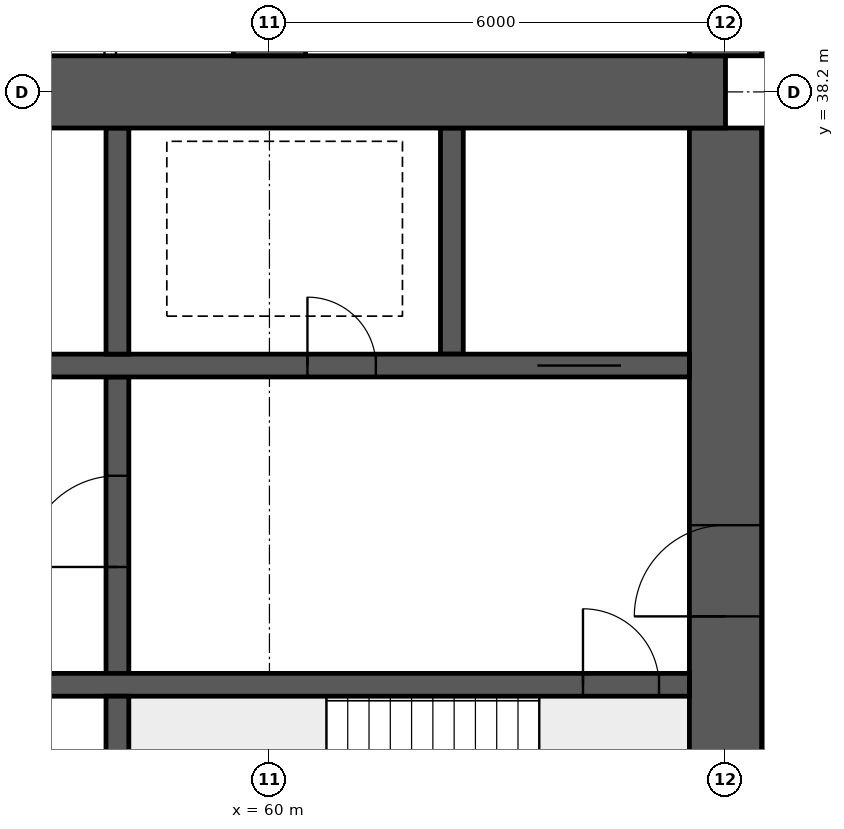
"""IFC4 building model, lengths in metres.
Left out: names, types, materials, properties, quantities, classifications, styles, units other than length and angle.
Written with IfcOpenShell. Run it as: python <this file> out.ifc"""

import sys

from ifc_helpers import new_model, si_unit, direction, frame, frame_2d, origin, place, context, subcontext, project, spatial, rectangle, extrude, element, fill, save


model = new_model("IFC4")
c1 = context("Model", 3, precision=1e-05, world=origin(), true_north=direction((0.0, 1.0)))
c2 = subcontext(c1, "Body", "Model", "MODEL_VIEW")
j1 = project(units=[si_unit("LENGTHUNIT", "METRE"), si_unit("PLANEANGLEUNIT", "RADIAN")], contexts=[c1])
p1 = place(None, origin())
s1 = spatial("IfcSite", under=j1, at=p1, CompositionType="ELEMENT")
p2 = place(p1, origin())
s2 = spatial("IfcBuilding", under=s1, at=p2, CompositionType="ELEMENT")
p3 = place(p2, frame((0.0, 0.0, 103.15)))
s3 = spatial("IfcBuildingStorey", under=s2, at=p3, CompositionType="ELEMENT", Elevation=103.15)
p4 = place(p3, frame((18.0, 38.2, 0.0), z_axis=(0.0, 0.0, 1.0), x_axis=(1.0, 0.0, 0.0)))
e1 = element("IfcWall", 1, at=p4, inside=s3, PredefinedType="SHEAR", context=c2, shape_type="SweptSolid", body=[
    extrude(rectangle(XDim=48.0, YDim=0.95, at=frame_2d((24.0, 0.0))), origin(), (0.0, 0.0, 1.0), 3.75),
])
p5 = place(p3, frame((66.0, 26.275, 0.0), z_axis=(0.0, 0.0, 1.0), x_axis=(0.0, 1.0, 0.0)))
e2 = element("IfcWall", 2, at=p5, inside=s3, PredefinedType="SHEAR", context=c2, shape_type="SweptSolid", body=[
    extrude(rectangle(XDim=11.45, YDim=0.95, at=frame_2d((5.725, 0.0))), origin(), (0.0, 0.0, 1.0), 3.75),
])
p6 = place(p5, frame((5.025, 0.0, 0.0)))
e3 = element("IfcOpeningElement", 3, at=p6, cuts=e2, PredefinedType="OPENING", context=c2, shape_type="SweptSolid", body=[
    extrude(rectangle(XDim=1.2, YDim=2.1, at=frame_2d((0.6, 1.05))), frame((0.0, 0.485, 0.0), z_axis=(0.0, -1.0, 0.0), x_axis=(1.0, 0.0, 0.0)), (0.0, 0.0, 1.0), 0.97),
])
p7 = place(p3, frame((18.475, 30.4, 0.0), z_axis=(0.0, 0.0, 1.0), x_axis=(1.0, 0.0, 0.0)))
e4 = element("IfcWall", 4, at=p7, inside=s3, PredefinedType="SHEAR", context=c2, shape_type="SweptSolid", body=[
    extrude(rectangle(XDim=47.05, YDim=0.3, at=frame_2d((23.525, 0.0))), origin(), (0.0, 0.0, 1.0), 3.75),
])
p8 = place(p7, frame((0.4, 0.0, 0.0)))
e5 = element("IfcOpeningElement", 5, at=p8, cuts=e4, PredefinedType="OPENING", context=c2, shape_type="SweptSolid", body=[
    extrude(rectangle(XDim=1.0, YDim=2.1, at=frame_2d((0.5, 1.05))), frame((0.0, 0.16, 0.0), z_axis=(0.0, -1.0, 0.0), x_axis=(1.0, 0.0, 0.0)), (0.0, 0.0, 1.0), 0.32),
])
p9 = place(p7, frame((45.65, 0.0, 0.0)))
e6 = element("IfcOpeningElement", 6, at=p9, cuts=e4, PredefinedType="OPENING", context=c2, shape_type="SweptSolid", body=[
    extrude(rectangle(XDim=1.0, YDim=2.1, at=frame_2d((0.5, 1.05))), frame((0.0, 0.16, 0.0), z_axis=(0.0, -1.0, 0.0), x_axis=(1.0, 0.0, 0.0)), (0.0, 0.0, 1.0), 0.32),
])
p10 = place(p7, frame((8.275, 0.0, 0.0)))
e7 = element("IfcOpeningElement", 7, at=p10, cuts=e4, PredefinedType="OPENING", context=c2, shape_type="SweptSolid", body=[
    extrude(rectangle(XDim=1.1, YDim=2.1, at=frame_2d((0.55, 1.05))), frame((0.0, 0.16, 0.0), z_axis=(0.0, -1.0, 0.0), x_axis=(1.0, 0.0, 0.0)), (0.0, 0.0, 1.0), 0.32),
])
p11 = place(p7, frame((10.875, 0.0, 0.0)))
e8 = element("IfcOpeningElement", 8, at=p11, cuts=e4, PredefinedType="OPENING", context=c2, shape_type="SweptSolid", body=[
    extrude(rectangle(XDim=1.1, YDim=2.1, at=frame_2d((0.55, 1.05))), frame((0.0, 0.16, 0.0), z_axis=(0.0, -1.0, 0.0), x_axis=(1.0, 0.0, 0.0)), (0.0, 0.0, 1.0), 0.32),
])
p12 = place(p7, frame((13.475, 0.0, 0.0)))
e9 = element("IfcOpeningElement", 9, at=p12, cuts=e4, PredefinedType="OPENING", context=c2, shape_type="SweptSolid", body=[
    extrude(rectangle(XDim=1.1, YDim=2.1, at=frame_2d((0.55, 1.05))), frame((0.0, 0.16, 0.0), z_axis=(0.0, -1.0, 0.0), x_axis=(1.0, 0.0, 0.0)), (0.0, 0.0, 1.0), 0.32),
])
p13 = place(p7, frame((16.075, 0.0, 0.0)))
e10 = element("IfcOpeningElement", 10, at=p13, cuts=e4, PredefinedType="OPENING", context=c2, shape_type="SweptSolid", body=[
    extrude(rectangle(XDim=1.1, YDim=2.1, at=frame_2d((0.55, 1.05))), frame((0.0, 0.16, 0.0), z_axis=(0.0, -1.0, 0.0), x_axis=(1.0, 0.0, 0.0)), (0.0, 0.0, 1.0), 0.32),
])
p14 = place(p7, frame((18.85, 0.0, 0.0)))
e11 = element("IfcOpeningElement", 11, at=p14, cuts=e4, PredefinedType="OPENING", context=c2, shape_type="SweptSolid", body=[
    extrude(rectangle(XDim=0.9, YDim=2.1, at=frame_2d((0.45, 1.05))), frame((0.0, 0.16, 0.0), z_axis=(0.0, -1.0, 0.0), x_axis=(1.0, 0.0, 0.0)), (0.0, 0.0, 1.0), 0.32),
])
p15 = place(p7, frame((30.142, 0.0, 0.0)))
e12 = element("IfcOpeningElement", 12, at=p15, cuts=e4, PredefinedType="OPENING", context=c2, shape_type="SweptSolid", body=[
    extrude(rectangle(XDim=1.1, YDim=2.1, at=frame_2d((0.55, 1.05))), frame((0.0, 0.16, 0.0), z_axis=(0.0, -1.0, 0.0), x_axis=(1.0, 0.0, 0.0)), (0.0, 0.0, 1.0), 0.32),
])
p16 = place(p7, frame((33.675, 0.0, 0.0)))
e13 = element("IfcOpeningElement", 13, at=p16, cuts=e4, PredefinedType="OPENING", context=c2, shape_type="SweptSolid", body=[
    extrude(rectangle(XDim=1.1, YDim=2.1, at=frame_2d((0.55, 1.05))), frame((0.0, 0.16, 0.0), z_axis=(0.0, -1.0, 0.0), x_axis=(1.0, 0.0, 0.0)), (0.0, 0.0, 1.0), 0.32),
])
p17 = place(p7, frame((37.208, 0.0, 0.0)))
e14 = element("IfcOpeningElement", 14, at=p17, cuts=e4, PredefinedType="OPENING", context=c2, shape_type="SweptSolid", body=[
    extrude(rectangle(XDim=1.1, YDim=2.1, at=frame_2d((0.55, 1.05))), frame((0.0, 0.16, 0.0), z_axis=(0.0, -1.0, 0.0), x_axis=(1.0, 0.0, 0.0)), (0.0, 0.0, 1.0), 0.32),
])
p18 = place(p3, frame((18.475, 34.6, 0.0), z_axis=(0.0, 0.0, 1.0), x_axis=(1.0, 0.0, 0.0)))
e15 = element("IfcWall", 15, at=p18, inside=s3, PredefinedType="SHEAR", context=c2, shape_type="SweptSolid", body=[
    extrude(rectangle(XDim=47.05, YDim=0.3, at=frame_2d((23.525, 0.0))), origin(), (0.0, 0.0, 1.0), 3.75),
])
p19 = place(p18, frame((0.9, 0.0, 0.0)))
e16 = element("IfcOpeningElement", 16, at=p19, cuts=e15, PredefinedType="OPENING", context=c2, shape_type="SweptSolid", body=[
    extrude(rectangle(XDim=1.1, YDim=2.1, at=frame_2d((0.55, 1.05))), frame((0.0, 0.16, 0.0), z_axis=(0.0, -1.0, 0.0), x_axis=(1.0, 0.0, 0.0)), (0.0, 0.0, 1.0), 0.32),
])
p20 = place(p18, frame((45.05, 0.0, 0.0)))
e17 = element("IfcOpeningElement", 17, at=p20, cuts=e15, PredefinedType="OPENING", context=c2, shape_type="SweptSolid", body=[
    extrude(rectangle(XDim=1.1, YDim=2.1, at=frame_2d((0.55, 1.05))), frame((0.0, 0.16, 0.0), z_axis=(0.0, -1.0, 0.0), x_axis=(1.0, 0.0, 0.0)), (0.0, 0.0, 1.0), 0.32),
])
p21 = place(p18, frame((4.125, 0.0, 0.0)))
e18 = element("IfcOpeningElement", 18, at=p21, cuts=e15, PredefinedType="OPENING", context=c2, shape_type="SweptSolid", body=[
    extrude(rectangle(XDim=0.9, YDim=2.1, at=frame_2d((0.45, 1.05))), frame((0.0, 0.16, 0.0), z_axis=(0.0, -1.0, 0.0), x_axis=(1.0, 0.0, 0.0)), (0.0, 0.0, 1.0), 0.32),
])
p22 = place(p18, frame((42.025, 0.0, 0.0)))
e19 = element("IfcOpeningElement", 19, at=p22, cuts=e15, PredefinedType="OPENING", context=c2, shape_type="SweptSolid", body=[
    extrude(rectangle(XDim=0.9, YDim=2.1, at=frame_2d((0.45, 1.05))), frame((0.0, 0.16, 0.0), z_axis=(0.0, -1.0, 0.0), x_axis=(1.0, 0.0, 0.0)), (0.0, 0.0, 1.0), 0.32),
])
p23 = place(p18, frame((8.9, 0.0, 0.0)))
e20 = element("IfcOpeningElement", 20, at=p23, cuts=e15, PredefinedType="OPENING", context=c2, shape_type="SweptSolid", body=[
    extrude(rectangle(XDim=0.9, YDim=2.1, at=frame_2d((0.45, 1.05))), frame((0.0, 0.16, 0.0), z_axis=(0.0, -1.0, 0.0), x_axis=(1.0, 0.0, 0.0)), (0.0, 0.0, 1.0), 0.32),
])
p24 = place(p18, frame((12.874, 0.0, 0.0)))
e21 = element("IfcOpeningElement", 21, at=p24, cuts=e15, PredefinedType="OPENING", context=c2, shape_type="SweptSolid", body=[
    extrude(rectangle(XDim=0.9, YDim=2.1, at=frame_2d((0.45, 1.05))), frame((0.0, 0.16, 0.0), z_axis=(0.0, -1.0, 0.0), x_axis=(1.0, 0.0, 0.0)), (0.0, 0.0, 1.0), 0.32),
])
p25 = place(p18, frame((16.521, 0.0, 0.0)))
e22 = element("IfcOpeningElement", 22, at=p25, cuts=e15, PredefinedType="OPENING", context=c2, shape_type="SweptSolid", body=[
    extrude(rectangle(XDim=0.9, YDim=2.1, at=frame_2d((0.45, 1.05))), frame((0.0, 0.16, 0.0), z_axis=(0.0, -1.0, 0.0), x_axis=(1.0, 0.0, 0.0)), (0.0, 0.0, 1.0), 0.32),
])
p26 = place(p18, frame((20.28, 0.0, 0.0)))
e23 = element("IfcOpeningElement", 23, at=p26, cuts=e15, PredefinedType="OPENING", context=c2, shape_type="SweptSolid", body=[
    extrude(rectangle(XDim=0.9, YDim=2.1, at=frame_2d((0.45, 1.05))), frame((0.0, 0.16, 0.0), z_axis=(0.0, -1.0, 0.0), x_axis=(1.0, 0.0, 0.0)), (0.0, 0.0, 1.0), 0.32),
])
p27 = place(p18, frame((24.686, 0.0, 0.0)))
e24 = element("IfcOpeningElement", 24, at=p27, cuts=e15, PredefinedType="OPENING", context=c2, shape_type="SweptSolid", body=[
    extrude(rectangle(XDim=0.9, YDim=2.1, at=frame_2d((0.45, 1.05))), frame((0.0, 0.16, 0.0), z_axis=(0.0, -1.0, 0.0), x_axis=(1.0, 0.0, 0.0)), (0.0, 0.0, 1.0), 0.32),
])
p28 = place(p18, frame((27.483, 0.0, 0.0)))
e25 = element("IfcOpeningElement", 25, at=p28, cuts=e15, PredefinedType="OPENING", context=c2, shape_type="SweptSolid", body=[
    extrude(rectangle(XDim=0.9, YDim=2.1, at=frame_2d((0.45, 1.05))), frame((0.0, 0.16, 0.0), z_axis=(0.0, -1.0, 0.0), x_axis=(1.0, 0.0, 0.0)), (0.0, 0.0, 1.0), 0.32),
])
p29 = place(p18, frame((29.653, 0.0, 0.0)))
e26 = element("IfcOpeningElement", 26, at=p29, cuts=e15, PredefinedType="OPENING", context=c2, shape_type="SweptSolid", body=[
    extrude(rectangle(XDim=0.9, YDim=2.1, at=frame_2d((0.45, 1.05))), frame((0.0, 0.16, 0.0), z_axis=(0.0, -1.0, 0.0), x_axis=(1.0, 0.0, 0.0)), (0.0, 0.0, 1.0), 0.32),
])
p30 = place(p18, frame((33.452, 0.0, 0.0)))
e27 = element("IfcOpeningElement", 27, at=p30, cuts=e15, PredefinedType="OPENING", context=c2, shape_type="SweptSolid", body=[
    extrude(rectangle(XDim=0.9, YDim=2.1, at=frame_2d((0.45, 1.05))), frame((0.0, 0.16, 0.0), z_axis=(0.0, -1.0, 0.0), x_axis=(1.0, 0.0, 0.0)), (0.0, 0.0, 1.0), 0.32),
])
p31 = place(p18, frame((37.403, 0.0, 0.0)))
e28 = element("IfcOpeningElement", 28, at=p31, cuts=e15, PredefinedType="OPENING", context=c2, shape_type="SweptSolid", body=[
    extrude(rectangle(XDim=0.9, YDim=2.1, at=frame_2d((0.45, 1.05))), frame((0.0, 0.16, 0.0), z_axis=(0.0, -1.0, 0.0), x_axis=(1.0, 0.0, 0.0)), (0.0, 0.0, 1.0), 0.32),
])
p32 = place(p3, frame((58.0, 26.275, 0.0), z_axis=(0.0, 0.0, 1.0), x_axis=(0.0, 1.0, 0.0)))
e29 = element("IfcWall", 29, at=p32, inside=s3, PredefinedType="SHEAR", context=c2, shape_type="SweptSolid", body=[
    extrude(rectangle(XDim=3.975, YDim=0.3, at=frame_2d((1.988, 0.0))), origin(), (0.0, 0.0, 1.0), 3.75),
])
p33 = place(p3, frame((58.0, 30.55, 0.0), z_axis=(0.0, 0.0, 1.0), x_axis=(0.0, 1.0, 0.0)))
e30 = element("IfcWall", 30, at=p33, inside=s3, PredefinedType="SHEAR", context=c2, shape_type="SweptSolid", body=[
    extrude(rectangle(XDim=3.9, YDim=0.3, at=frame_2d((1.95, 0.0))), origin(), (0.0, 0.0, 1.0), 3.75),
])
p34 = place(p33, frame((1.4, 0.0, 0.0)))
e31 = element("IfcOpeningElement", 31, at=p34, cuts=e30, PredefinedType="OPENING", context=c2, shape_type="SweptSolid", body=[
    extrude(rectangle(XDim=1.2, YDim=2.1, at=frame_2d((0.6, 1.05))), frame((0.0, 0.16, 0.0), z_axis=(0.0, -1.0, 0.0), x_axis=(1.0, 0.0, 0.0)), (0.0, 0.0, 1.0), 0.32),
])
for number, where, z_axis, x_axis in (
    (32, (62.4, 34.75, 0.0), (0.0, 0.0, 1.0), (0.0, 1.0, 0.0)),
    (33, (58.0, 34.75, 0.0), (0.0, 0.0, 1.0), (0.0, 1.0, 0.0)),
):
    element("IfcWall", number, at=place(p3, frame(where, z_axis=z_axis, x_axis=x_axis)), inside=s3, PredefinedType="SHEAR", context=c2, shape_type="SweptSolid", body=[
        extrude(rectangle(XDim=2.975, YDim=0.3, at=frame_2d((1.488, 0.0))), origin(), (0.0, 0.0, 1.0), 3.75),
    ])
for number, where, z_axis, x_axis in (
    (34, (60.0, 38.675, 0.0), (0.0, 0.0, 1.0), (0.0, 1.0, 0.0)),
    (35, (66.0, 38.675, 0.0), (0.0, 0.0, 1.0), (0.0, 1.0, 0.0)),
):
    element("IfcWall", number, at=place(p3, frame(where, z_axis=z_axis, x_axis=x_axis)), inside=s3, PredefinedType="SHEAR", context=c2, shape_type="SweptSolid", body=[
        extrude(rectangle(XDim=9.325, YDim=0.95, at=frame_2d((4.663, 0.0))), origin(), (0.0, 0.0, 1.0), 3.75),
    ])
p35 = place(p3, frame((57.905, 38.675, 0.0), z_axis=(0.0, 0.0, 1.0), x_axis=(0.0, 1.0, 0.0)))
e36 = element("IfcWall", 36, at=p35, inside=s3, PredefinedType="PARTITIONING", context=c2, shape_type="SweptSolid", body=[
    extrude(rectangle(XDim=9.225, YDim=0.15, at=frame_2d((4.612, 0.0))), origin(), (0.0, 0.0, 1.0), 3.5),
])
p36 = place(p6, origin())
e37 = element("IfcDoor", 37, at=p36, inside=s3, OperationType="SINGLE_SWING_LEFT", PredefinedType="DOOR", context=c2, shape_type="SweptSolid", body=[
    extrude(rectangle(XDim=1.2, YDim=2.1, at=frame_2d((0.6, 1.05))), frame((0.0, 0.025, 0.0), z_axis=(0.0, -1.0, 0.0), x_axis=(1.0, 0.0, 0.0)), (0.0, 0.0, 1.0), 0.05),
])
fill(e3, e37)
p37 = place(p9, origin())
e38 = element("IfcDoor", 38, at=p37, inside=s3, OperationType="SINGLE_SWING_LEFT", PredefinedType="DOOR", context=c2, shape_type="SweptSolid", body=[
    extrude(rectangle(XDim=1.0, YDim=2.1, at=frame_2d((0.5, 1.05))), frame((0.0, 0.025, 0.0), z_axis=(0.0, -1.0, 0.0), x_axis=(1.0, 0.0, 0.0)), (0.0, 0.0, 1.0), 0.05),
])
fill(e6, e38)
p38 = place(p20, origin())
e39 = element("IfcDoor", 39, at=p38, inside=s3, OperationType="DOUBLE_DOOR_SLIDING", PredefinedType="DOOR", context=c2, shape_type="SweptSolid", body=[
    extrude(rectangle(XDim=1.1, YDim=2.1, at=frame_2d((0.55, 1.05))), frame((0.0, 0.025, 0.0), z_axis=(0.0, -1.0, 0.0), x_axis=(1.0, 0.0, 0.0)), (0.0, 0.0, 1.0), 0.05),
])
fill(e17, e39)
p39 = place(p22, origin())
e40 = element("IfcDoor", 40, at=p39, inside=s3, OperationType="SINGLE_SWING_LEFT", PredefinedType="DOOR", context=c2, shape_type="SweptSolid", body=[
    extrude(rectangle(XDim=0.9, YDim=2.1, at=frame_2d((0.45, 1.05))), frame((0.0, 0.025, 0.0), z_axis=(0.0, -1.0, 0.0), x_axis=(1.0, 0.0, 0.0)), (0.0, 0.0, 1.0), 0.05),
])
fill(e19, e40)
p40 = place(p34, origin())
e41 = element("IfcDoor", 41, at=p40, inside=s3, OperationType="SINGLE_SWING_LEFT", PredefinedType="DOOR", context=c2, shape_type="SweptSolid", body=[
    extrude(rectangle(XDim=1.2, YDim=2.1, at=frame_2d((0.6, 1.05))), frame((0.0, 0.025, 0.0), z_axis=(0.0, -1.0, 0.0), x_axis=(1.0, 0.0, 0.0)), (0.0, 0.0, 1.0), 0.05),
])
fill(e31, e41)
save(model, sys.argv[1])
